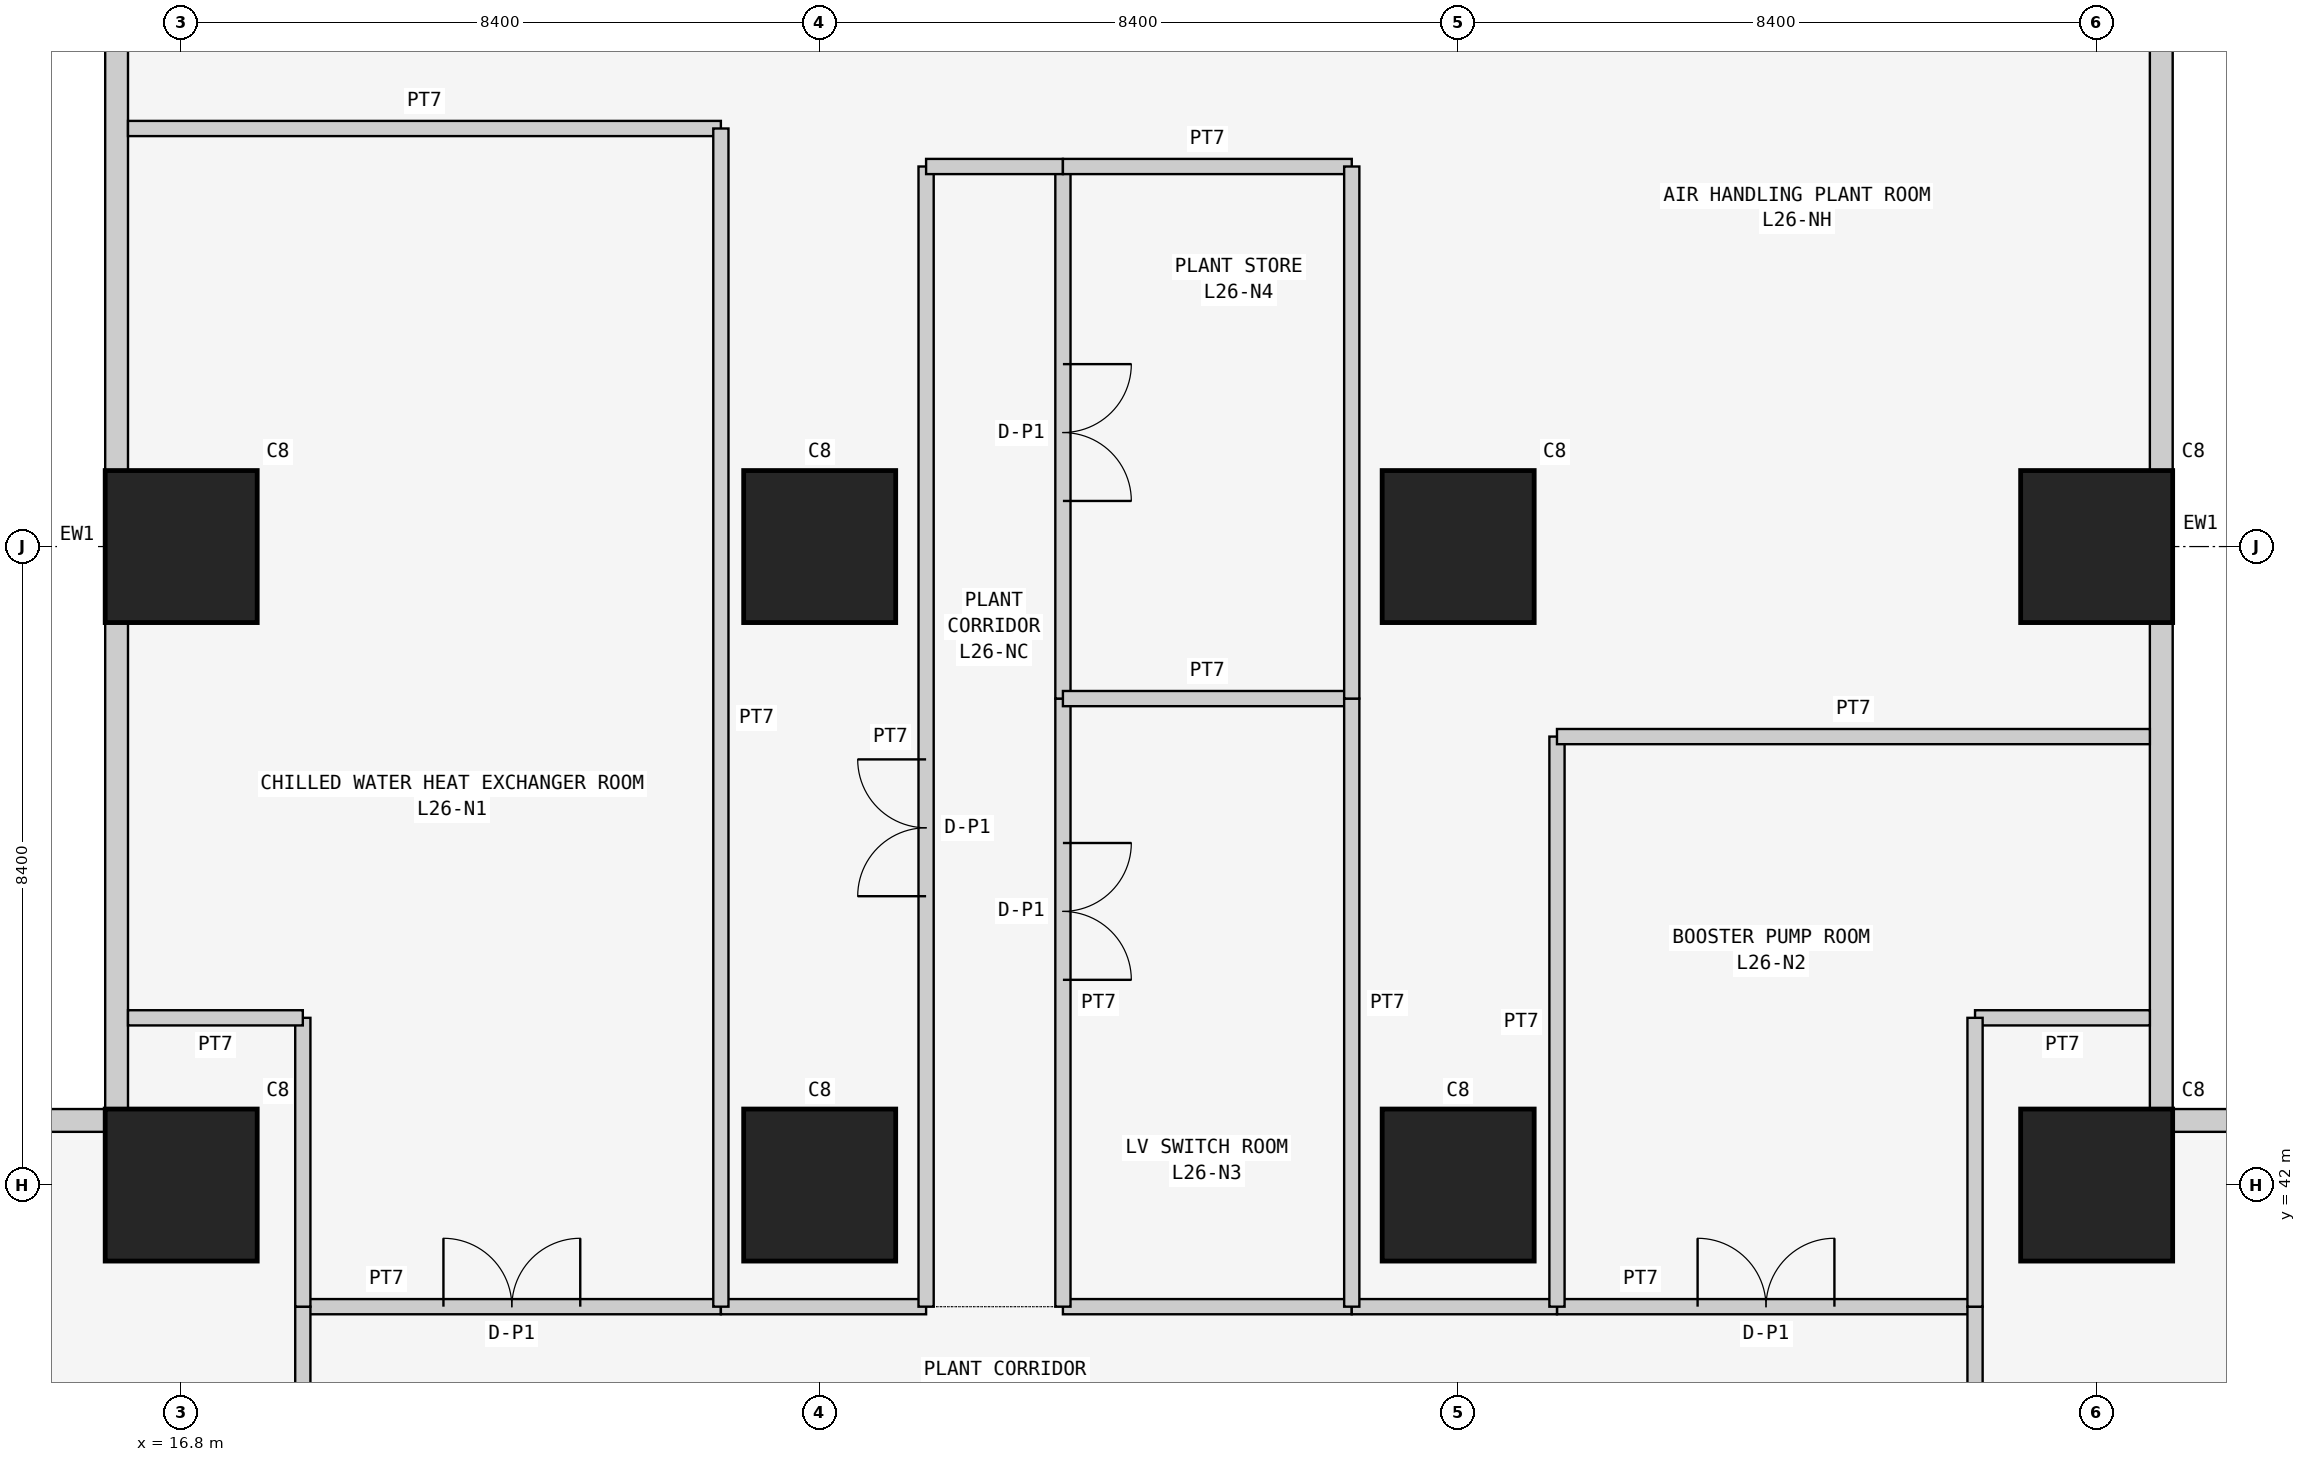
"""IFC4 building model, lengths in metres.
Left out: names, types, materials, properties, quantities, classifications, styles, units other than length and angle.
Written with IfcOpenShell. Run it as: python <this file> out.ifc"""

import sys

from ifc_helpers import new_model, si_unit, direction, frame, frame_2d, origin, origin_2d, place, context, subcontext, project, spatial, rectangle, extrude, element, fill, save


model = new_model("IFC4")
c1 = context("Model", 3, precision=1e-05, world=origin(), true_north=direction((0.0, 1.0)))
c2 = subcontext(c1, "Body", "Model", "MODEL_VIEW")
j1 = project(units=[si_unit("LENGTHUNIT", "METRE"), si_unit("PLANEANGLEUNIT", "RADIAN")], contexts=[c1])
p1 = place(None, origin())
s1 = spatial("IfcSite", under=j1, at=p1, CompositionType="ELEMENT")
p2 = place(p1, origin())
s2 = spatial("IfcBuilding", under=s1, at=p2, CompositionType="ELEMENT")
p3 = place(p2, frame((0.0, 0.0, 102.9)))
s3 = spatial("IfcBuildingStorey", under=s2, at=p3, CompositionType="ELEMENT", Elevation=102.9)
for number, where, z_axis, x_axis in (
    (1, (16.8, 42.0, 0.0), (0.0, 0.0, 1.0), (1.0, 0.0, 0.0)),
    (2, (16.8, 50.4, 0.0), (0.0, 0.0, 1.0), (1.0, 0.0, 0.0)),
    (3, (25.2, 42.0, 0.0), (0.0, 0.0, 1.0), (1.0, 0.0, 0.0)),
    (4, (25.2, 50.4, 0.0), (0.0, 0.0, 1.0), (1.0, 0.0, 0.0)),
    (5, (33.6, 42.0, 0.0), (0.0, 0.0, 1.0), (1.0, 0.0, 0.0)),
    (6, (33.6, 50.4, 0.0), (0.0, 0.0, 1.0), (1.0, 0.0, 0.0)),
    (7, (42.0, 42.0, 0.0), (0.0, 0.0, 1.0), (1.0, 0.0, 0.0)),
    (8, (42.0, 50.4, 0.0), (0.0, 0.0, 1.0), (1.0, 0.0, 0.0)),
):
    element("IfcColumn", number, at=place(p3, frame(where, z_axis=z_axis, x_axis=x_axis)), inside=s3, PredefinedType="COLUMN", context=c2, shape_type="SweptSolid", body=[
        extrude(rectangle(XDim=2.0, YDim=2.0, at=origin_2d()), origin(), (0.0, 0.0, 1.0), 6.0),
    ])
p4 = place(p3, frame((15.8, 42.85, 0.0), z_axis=(0.0, 0.0, 1.0), x_axis=(-1.0, 0.0, 0.0)))
e9 = element("IfcWall", 9, at=p4, inside=s3, PredefinedType="SOLIDWALL", context=c2, shape_type="SweptSolid", body=[
    extrude(rectangle(XDim=15.4, YDim=0.3, at=frame_2d((7.7, 0.0))), origin(), (0.0, 0.0, 1.0), 5.85),
])
p5 = place(p3, frame((58.4, 42.85, 0.0), z_axis=(0.0, 0.0, 1.0), x_axis=(-1.0, 0.0, 0.0)))
e10 = element("IfcWall", 10, at=p5, inside=s3, PredefinedType="SOLIDWALL", context=c2, shape_type="SweptSolid", body=[
    extrude(rectangle(XDim=15.7, YDim=0.3, at=frame_2d((7.85, 0.0))), origin(), (0.0, 0.0, 1.0), 5.85),
])
p6 = place(p3, frame((42.85, 43.0, 0.0), z_axis=(0.0, 0.0, 1.0), x_axis=(0.0, 1.0, 0.0)))
e11 = element("IfcWall", 11, at=p6, inside=s3, PredefinedType="SOLIDWALL", context=c2, shape_type="SweptSolid", body=[
    extrude(rectangle(XDim=15.4, YDim=0.3, at=frame_2d((7.7, 0.0))), origin(), (0.0, 0.0, 1.0), 5.85),
])
p7 = place(p3, frame((15.95, 58.4, 0.0), z_axis=(0.0, 0.0, 1.0), x_axis=(0.0, -1.0, 0.0)))
e12 = element("IfcWall", 12, at=p7, inside=s3, PredefinedType="SOLIDWALL", context=c2, shape_type="SweptSolid", body=[
    extrude(rectangle(XDim=15.7, YDim=0.3, at=frame_2d((7.85, 0.0))), origin(), (0.0, 0.0, 1.0), 5.85),
])
p8 = place(p3, frame((18.4, 40.4, 0.0), z_axis=(0.0, 0.0, 1.0), x_axis=(1.0, 0.0, 0.0)))
e13 = element("IfcWall", 13, at=p8, inside=s3, PredefinedType="PARTITIONING", context=c2, shape_type="SweptSolid", body=[
    extrude(rectangle(XDim=5.5, YDim=0.2, at=frame_2d((2.75, 0.0))), origin(), (0.0, 0.0, 1.0), 5.85),
])
p9 = place(p8, frame((1.85, 0.0, 0.0)))
e14 = element("IfcOpeningElement", 14, at=p9, cuts=e13, PredefinedType="OPENING", context=c2, shape_type="SweptSolid", body=[
    extrude(rectangle(XDim=1.8, YDim=2.4, at=frame_2d((0.9, 1.2))), frame((0.0, 0.11, 0.0), z_axis=(0.0, -1.0, 0.0), x_axis=(1.0, 0.0, 0.0)), (0.0, 0.0, 1.0), 0.22),
])
p10 = place(p3, frame((34.9, 40.4, 0.0), z_axis=(0.0, 0.0, 1.0), x_axis=(1.0, 0.0, 0.0)))
e15 = element("IfcWall", 15, at=p10, inside=s3, PredefinedType="PARTITIONING", context=c2, shape_type="SweptSolid", body=[
    extrude(rectangle(XDim=5.5, YDim=0.2, at=frame_2d((2.75, 0.0))), origin(), (0.0, 0.0, 1.0), 5.85),
])
p11 = place(p10, frame((1.85, 0.0, 0.0)))
e16 = element("IfcOpeningElement", 16, at=p11, cuts=e15, PredefinedType="OPENING", context=c2, shape_type="SweptSolid", body=[
    extrude(rectangle(XDim=1.8, YDim=2.4, at=frame_2d((0.9, 1.2))), frame((0.0, 0.11, 0.0), z_axis=(0.0, -1.0, 0.0), x_axis=(1.0, 0.0, 0.0)), (0.0, 0.0, 1.0), 0.22),
])
p12 = place(p3, frame((28.4, 40.4, 0.0), z_axis=(0.0, 0.0, 1.0), x_axis=(1.0, 0.0, 0.0)))
e17 = element("IfcWall", 17, at=p12, inside=s3, PredefinedType="PARTITIONING", context=c2, shape_type="SweptSolid", body=[
    extrude(rectangle(XDim=3.8, YDim=0.2, at=frame_2d((1.9, 0.0))), origin(), (0.0, 0.0, 1.0), 5.85),
])
p13 = place(p3, frame((23.9, 40.4, 0.0), z_axis=(0.0, 0.0, 1.0), x_axis=(1.0, 0.0, 0.0)))
e18 = element("IfcWall", 18, at=p13, inside=s3, PredefinedType="PARTITIONING", context=c2, shape_type="SweptSolid", body=[
    extrude(rectangle(XDim=2.7, YDim=0.2, at=frame_2d((1.35, 0.0))), origin(), (0.0, 0.0, 1.0), 5.85),
])
p14 = place(p3, frame((32.2, 40.4, 0.0), z_axis=(0.0, 0.0, 1.0), x_axis=(1.0, 0.0, 0.0)))
e19 = element("IfcWall", 19, at=p14, inside=s3, PredefinedType="PARTITIONING", context=c2, shape_type="SweptSolid", body=[
    extrude(rectangle(XDim=2.7, YDim=0.2, at=frame_2d((1.35, 0.0))), origin(), (0.0, 0.0, 1.0), 5.85),
])
p15 = place(p3, frame((40.4, 40.4, 0.0), z_axis=(0.0, 0.0, 1.0), x_axis=(0.0, -1.0, 0.0)))
e20 = element("IfcWall", 20, at=p15, inside=s3, PredefinedType="PARTITIONING", context=c2, shape_type="SweptSolid", body=[
    extrude(rectangle(XDim=5.5, YDim=0.2, at=frame_2d((2.75, 0.0))), origin(), (0.0, 0.0, 1.0), 5.85),
])
p16 = place(p15, frame((1.85, 0.0, 0.0)))
e21 = element("IfcOpeningElement", 21, at=p16, cuts=e20, PredefinedType="OPENING", context=c2, shape_type="SweptSolid", body=[
    extrude(rectangle(XDim=1.8, YDim=2.4, at=frame_2d((0.9, 1.2))), frame((0.0, 0.11, 0.0), z_axis=(0.0, -1.0, 0.0), x_axis=(1.0, 0.0, 0.0)), (0.0, 0.0, 1.0), 0.22),
])
p17 = place(p3, frame((18.4, 34.9, 0.0), z_axis=(0.0, 0.0, 1.0), x_axis=(0.0, 1.0, 0.0)))
e22 = element("IfcWall", 22, at=p17, inside=s3, PredefinedType="PARTITIONING", context=c2, shape_type="SweptSolid", body=[
    extrude(rectangle(XDim=5.5, YDim=0.2, at=frame_2d((2.75, 0.0))), origin(), (0.0, 0.0, 1.0), 5.85),
])
p18 = place(p17, frame((1.85, 0.0, 0.0)))
e23 = element("IfcOpeningElement", 23, at=p18, cuts=e22, PredefinedType="OPENING", context=c2, shape_type="SweptSolid", body=[
    extrude(rectangle(XDim=1.8, YDim=2.4, at=frame_2d((0.9, 1.2))), frame((0.0, 0.11, 0.0), z_axis=(0.0, -1.0, 0.0), x_axis=(1.0, 0.0, 0.0)), (0.0, 0.0, 1.0), 0.22),
])
p19 = place(p3, frame((16.1, 55.9, 0.0), z_axis=(0.0, 0.0, 1.0), x_axis=(1.0, 0.0, 0.0)))
e24 = element("IfcWall", 24, at=p19, inside=s3, PredefinedType="PARTITIONING", context=c2, shape_type="SweptSolid", body=[
    extrude(rectangle(XDim=7.8, YDim=0.2, at=frame_2d((3.9, 0.0))), origin(), (0.0, 0.0, 1.0), 5.75),
])
p20 = place(p3, frame((23.9, 55.9, 0.0), z_axis=(0.0, 0.0, 1.0), x_axis=(0.0, -1.0, 0.0)))
e25 = element("IfcWall", 25, at=p20, inside=s3, PredefinedType="PARTITIONING", context=c2, shape_type="SweptSolid", body=[
    extrude(rectangle(XDim=15.5, YDim=0.2, at=frame_2d((7.75, 0.0))), origin(), (0.0, 0.0, 1.0), 5.75),
])
p21 = place(p3, frame((18.4, 40.4, 0.0), z_axis=(0.0, 0.0, 1.0), x_axis=(0.0, 1.0, 0.0)))
e26 = element("IfcWall", 26, at=p21, inside=s3, PredefinedType="PARTITIONING", context=c2, shape_type="SweptSolid", body=[
    extrude(rectangle(XDim=3.8, YDim=0.2, at=frame_2d((1.9, 0.0))), origin(), (0.0, 0.0, 1.0), 5.85),
])
p22 = place(p3, frame((18.4, 44.2, 0.0), z_axis=(0.0, 0.0, 1.0), x_axis=(-1.0, 0.0, 0.0)))
e27 = element("IfcWall", 27, at=p22, inside=s3, PredefinedType="PARTITIONING", context=c2, shape_type="SweptSolid", body=[
    extrude(rectangle(XDim=2.3, YDim=0.2, at=frame_2d((1.15, 0.0))), origin(), (0.0, 0.0, 1.0), 5.85),
])
p23 = place(p3, frame((34.9, 40.4, 0.0), z_axis=(0.0, 0.0, 1.0), x_axis=(0.0, 1.0, 0.0)))
e28 = element("IfcWall", 28, at=p23, inside=s3, PredefinedType="PARTITIONING", context=c2, shape_type="SweptSolid", body=[
    extrude(rectangle(XDim=7.5, YDim=0.2, at=frame_2d((3.75, 0.0))), origin(), (0.0, 0.0, 1.0), 5.85),
])
p24 = place(p3, frame((34.9, 47.9, 0.0), z_axis=(0.0, 0.0, 1.0), x_axis=(1.0, 0.0, 0.0)))
e29 = element("IfcWall", 29, at=p24, inside=s3, PredefinedType="PARTITIONING", context=c2, shape_type="SweptSolid", body=[
    extrude(rectangle(XDim=7.8, YDim=0.2, at=frame_2d((3.9, 0.0))), origin(), (0.0, 0.0, 1.0), 5.85),
])
p25 = place(p3, frame((42.7, 44.2, 0.0), z_axis=(0.0, 0.0, 1.0), x_axis=(-1.0, 0.0, 0.0)))
e30 = element("IfcWall", 30, at=p25, inside=s3, PredefinedType="PARTITIONING", context=c2, shape_type="SweptSolid", body=[
    extrude(rectangle(XDim=2.3, YDim=0.2, at=frame_2d((1.15, 0.0))), origin(), (0.0, 0.0, 1.0), 5.85),
])
p26 = place(p3, frame((40.4, 44.2, 0.0), z_axis=(0.0, 0.0, 1.0), x_axis=(0.0, -1.0, 0.0)))
e31 = element("IfcWall", 31, at=p26, inside=s3, PredefinedType="PARTITIONING", context=c2, shape_type="SweptSolid", body=[
    extrude(rectangle(XDim=3.8, YDim=0.2, at=frame_2d((1.9, 0.0))), origin(), (0.0, 0.0, 1.0), 5.85),
])
p27 = place(p3, frame((28.4, 48.4, 0.0), z_axis=(0.0, 0.0, 1.0), x_axis=(0.0, -1.0, 0.0)))
e32 = element("IfcWall", 32, at=p27, inside=s3, PredefinedType="PARTITIONING", context=c2, shape_type="SweptSolid", body=[
    extrude(rectangle(XDim=8.0, YDim=0.2, at=frame_2d((4.0, 0.0))), origin(), (0.0, 0.0, 1.0), 5.85),
])
p28 = place(p27, frame((1.9, 0.0, 0.0)))
e33 = element("IfcOpeningElement", 33, at=p28, cuts=e32, PredefinedType="OPENING", context=c2, shape_type="SweptSolid", body=[
    extrude(rectangle(XDim=1.8, YDim=2.4, at=frame_2d((0.9, 1.2))), frame((0.0, 0.11, 0.0), z_axis=(0.0, -1.0, 0.0), x_axis=(1.0, 0.0, 0.0)), (0.0, 0.0, 1.0), 0.22),
])
p29 = place(p3, frame((28.4, 55.4, 0.0), z_axis=(0.0, 0.0, 1.0), x_axis=(0.0, -1.0, 0.0)))
e34 = element("IfcWall", 34, at=p29, inside=s3, PredefinedType="PARTITIONING", context=c2, shape_type="SweptSolid", body=[
    extrude(rectangle(XDim=7.0, YDim=0.2, at=frame_2d((3.5, 0.0))), origin(), (0.0, 0.0, 1.0), 5.75),
])
p30 = place(p29, frame((2.6, 0.0, 0.0)))
e35 = element("IfcOpeningElement", 35, at=p30, cuts=e34, PredefinedType="OPENING", context=c2, shape_type="SweptSolid", body=[
    extrude(rectangle(XDim=1.8, YDim=2.4, at=frame_2d((0.9, 1.2))), frame((0.0, 0.11, 0.0), z_axis=(0.0, -1.0, 0.0), x_axis=(1.0, 0.0, 0.0)), (0.0, 0.0, 1.0), 0.22),
])
p31 = place(p3, frame((26.6, 40.4, 0.0), z_axis=(0.0, 0.0, 1.0), x_axis=(0.0, 1.0, 0.0)))
e36 = element("IfcWall", 36, at=p31, inside=s3, PredefinedType="PARTITIONING", context=c2, shape_type="SweptSolid", body=[
    extrude(rectangle(XDim=15.0, YDim=0.2, at=frame_2d((7.5, 0.0))), origin(), (0.0, 0.0, 1.0), 5.75),
])
p32 = place(p31, frame((5.4, 0.0, 0.0)))
e37 = element("IfcOpeningElement", 37, at=p32, cuts=e36, PredefinedType="OPENING", context=c2, shape_type="SweptSolid", body=[
    extrude(rectangle(XDim=1.8, YDim=2.4, at=frame_2d((0.9, 1.2))), frame((0.0, 0.11, 0.0), z_axis=(0.0, -1.0, 0.0), x_axis=(1.0, 0.0, 0.0)), (0.0, 0.0, 1.0), 0.22),
])
p33 = place(p3, frame((26.6, 55.4, 0.0), z_axis=(0.0, 0.0, 1.0), x_axis=(1.0, 0.0, 0.0)))
e38 = element("IfcWall", 38, at=p33, inside=s3, PredefinedType="PARTITIONING", context=c2, shape_type="SweptSolid", body=[
    extrude(rectangle(XDim=1.8, YDim=0.2, at=frame_2d((0.9, 0.0))), origin(), (0.0, 0.0, 1.0), 5.75),
])
p34 = place(p3, frame((28.4, 48.4, 0.0), z_axis=(0.0, 0.0, 1.0), x_axis=(1.0, 0.0, 0.0)))
e39 = element("IfcWall", 39, at=p34, inside=s3, PredefinedType="PARTITIONING", context=c2, shape_type="SweptSolid", body=[
    extrude(rectangle(XDim=3.8, YDim=0.2, at=frame_2d((1.9, 0.0))), origin(), (0.0, 0.0, 1.0), 5.85),
])
p35 = place(p3, frame((32.2, 48.4, 0.0), z_axis=(0.0, 0.0, 1.0), x_axis=(0.0, -1.0, 0.0)))
e40 = element("IfcWall", 40, at=p35, inside=s3, PredefinedType="PARTITIONING", context=c2, shape_type="SweptSolid", body=[
    extrude(rectangle(XDim=8.0, YDim=0.2, at=frame_2d((4.0, 0.0))), origin(), (0.0, 0.0, 1.0), 5.85),
])
p36 = place(p3, frame((28.4, 55.4, 0.0), z_axis=(0.0, 0.0, 1.0), x_axis=(1.0, 0.0, 0.0)))
e41 = element("IfcWall", 41, at=p36, inside=s3, PredefinedType="PARTITIONING", context=c2, shape_type="SweptSolid", body=[
    extrude(rectangle(XDim=3.8, YDim=0.2, at=frame_2d((1.9, 0.0))), origin(), (0.0, 0.0, 1.0), 5.75),
])
p37 = place(p3, frame((32.2, 55.4, 0.0), z_axis=(0.0, 0.0, 1.0), x_axis=(0.0, -1.0, 0.0)))
e42 = element("IfcWall", 42, at=p37, inside=s3, PredefinedType="PARTITIONING", context=c2, shape_type="SweptSolid", body=[
    extrude(rectangle(XDim=7.0, YDim=0.2, at=frame_2d((3.5, 0.0))), origin(), (0.0, 0.0, 1.0), 5.75),
])
p38 = place(p9, origin())
e43 = element("IfcDoor", 43, at=p38, inside=s3, OperationType="DOUBLE_DOOR_SINGLE_SWING", PredefinedType="DOOR", context=c2, shape_type="SweptSolid", body=[
    extrude(rectangle(XDim=1.8, YDim=2.4, at=frame_2d((0.9, 1.2))), frame((0.0, 0.025, 0.0), z_axis=(0.0, -1.0, 0.0), x_axis=(1.0, 0.0, 0.0)), (0.0, 0.0, 1.0), 0.05),
])
fill(e14, e43)
p39 = place(p11, origin())
e44 = element("IfcDoor", 44, at=p39, inside=s3, OperationType="DOUBLE_DOOR_SINGLE_SWING", PredefinedType="DOOR", context=c2, shape_type="SweptSolid", body=[
    extrude(rectangle(XDim=1.8, YDim=2.4, at=frame_2d((0.9, 1.2))), frame((0.0, 0.025, 0.0), z_axis=(0.0, -1.0, 0.0), x_axis=(1.0, 0.0, 0.0)), (0.0, 0.0, 1.0), 0.05),
])
fill(e16, e44)
p40 = place(p28, origin())
e45 = element("IfcDoor", 45, at=p40, inside=s3, OperationType="DOUBLE_DOOR_SINGLE_SWING", PredefinedType="DOOR", context=c2, shape_type="SweptSolid", body=[
    extrude(rectangle(XDim=1.8, YDim=2.4, at=frame_2d((0.9, 1.2))), frame((0.0, 0.025, 0.0), z_axis=(0.0, -1.0, 0.0), x_axis=(1.0, 0.0, 0.0)), (0.0, 0.0, 1.0), 0.05),
])
fill(e33, e45)
p41 = place(p30, origin())
e46 = element("IfcDoor", 46, at=p41, inside=s3, OperationType="DOUBLE_DOOR_SINGLE_SWING", PredefinedType="DOOR", context=c2, shape_type="SweptSolid", body=[
    extrude(rectangle(XDim=1.8, YDim=2.4, at=frame_2d((0.9, 1.2))), frame((0.0, 0.025, 0.0), z_axis=(0.0, -1.0, 0.0), x_axis=(1.0, 0.0, 0.0)), (0.0, 0.0, 1.0), 0.05),
])
fill(e35, e46)
p42 = place(p32, origin())
e47 = element("IfcDoor", 47, at=p42, inside=s3, OperationType="DOUBLE_DOOR_SINGLE_SWING", PredefinedType="DOOR", context=c2, shape_type="SweptSolid", body=[
    extrude(rectangle(XDim=1.8, YDim=2.4, at=frame_2d((0.9, 1.2))), frame((0.0, 0.025, 0.0), z_axis=(0.0, -1.0, 0.0), x_axis=(1.0, 0.0, 0.0)), (0.0, 0.0, 1.0), 0.05),
])
fill(e37, e47)
save(model, sys.argv[1])
